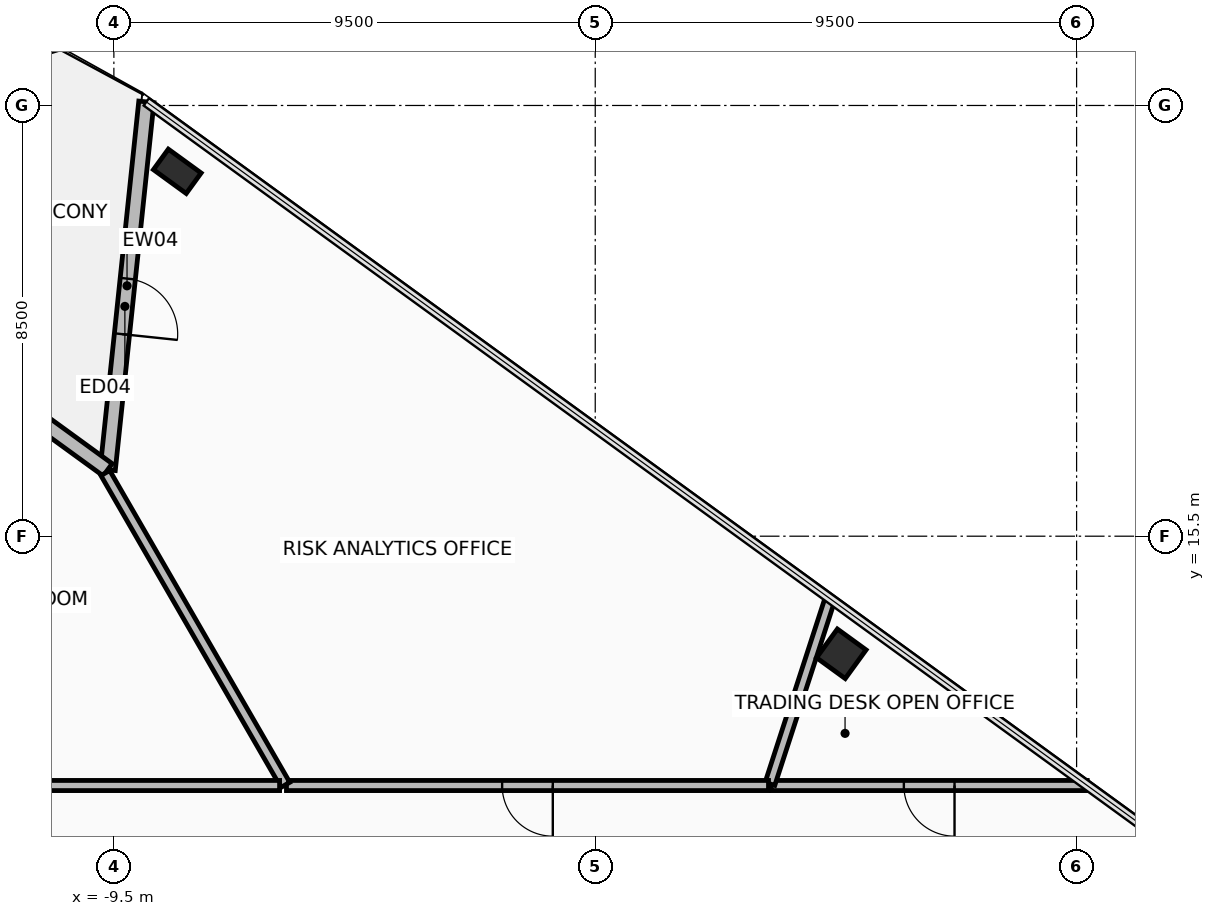
"""IFC4 building model, lengths in metres.
Left out: names, types, materials, properties, quantities, classifications, styles, units other than length and angle.
Written with IfcOpenShell. Run it as: python <this file> out.ifc"""

import sys

from ifc_helpers import new_model, si_unit, direction, frame, frame_2d, origin, origin_2d, place, context, subcontext, project, spatial, rectangle, hollow_rectangle, extrude, element, fill, save


model = new_model("IFC4")
c1 = context("Model", 3, precision=1e-05, world=origin(), true_north=direction((0.0, 1.0)))
c2 = subcontext(c1, "Body", "Model", "MODEL_VIEW")
j1 = project(units=[si_unit("LENGTHUNIT", "METRE"), si_unit("PLANEANGLEUNIT", "RADIAN")], contexts=[c1])
p1 = place(None, origin())
s1 = spatial("IfcSite", under=j1, at=p1, CompositionType="ELEMENT")
p2 = place(p1, origin())
s2 = spatial("IfcBuilding", under=s1, at=p2, CompositionType="ELEMENT")
p3 = place(p2, frame((0.0, 0.0, 116.05)))
s3 = spatial("IfcBuildingStorey", under=s2, at=p3, CompositionType="ELEMENT", Elevation=116.05)
p4 = place(p3, frame((4.856, 13.179, 0.0), z_axis=(0.0, 0.0, 1.0), x_axis=(-0.809016994375, 0.587785252292, 0.0)))
e1 = element("IfcColumn", 1, at=p4, inside=s3, PredefinedType="COLUMN", context=c2, shape_type="SweptSolid", body=[
    extrude(hollow_rectangle(XDim=0.7, YDim=0.7, WallThickness=0.04, at=origin_2d()), origin(), (0.0, 0.0, 1.0), 3.6),
])
p5 = place(p3, frame((-8.249, 22.701, 0.0), z_axis=(0.0, 0.0, 1.0), x_axis=(-0.809016994375, 0.587785252292, 0.0)))
e2 = element("IfcColumn", 2, at=p5, inside=s3, PredefinedType="COLUMN", context=c2, shape_type="SweptSolid", body=[
    extrude(hollow_rectangle(XDim=0.5, YDim=0.8, WallThickness=0.04, at=origin_2d()), origin(), (0.0, 0.0, 1.0), 3.6),
])
p6 = place(p3, frame((-8.859, 24.071, 0.0), z_axis=(0.0, 0.0, 1.0), x_axis=(-0.104512431924, -0.9945235802, 0.0)))
e3 = element("IfcWall", 3, at=p6, inside=s3, PredefinedType="STANDARD", context=c2, shape_type="SweptSolid", body=[
    extrude(rectangle(XDim=7.3, YDim=0.3, at=frame_2d((3.65, 0.0))), origin(), (0.0, 0.0, 1.0), 2.705),
])
p7 = place(p6, frame((3.508, 0.0, 0.0)))
e4 = element("IfcOpeningElement", 4, at=p7, cuts=e3, PredefinedType="OPENING", context=c2, shape_type="SweptSolid", body=[
    extrude(rectangle(XDim=1.1, YDim=2.2, at=frame_2d((0.55, 1.1))), frame((0.0, 0.16, 0.0), z_axis=(0.0, -1.0, 0.0), x_axis=(1.0, 0.0, 0.0)), (0.0, 0.0, 1.0), 0.32),
])
p8 = place(p3, frame((-9.622, 16.811, 0.0), z_axis=(0.0, 0.0, 1.0), x_axis=(-0.809002104592, 0.587805745775, 0.0)))
e5 = element("IfcWall", 5, at=p8, inside=s3, PredefinedType="STANDARD", context=c2, shape_type="SweptSolid", body=[
    extrude(rectangle(XDim=7.3, YDim=0.3, at=frame_2d((3.65, 0.0))), origin(), (0.0, 0.0, 1.0), 2.705),
])
p9 = place(p8, frame((2.85, 0.0, 0.325)))
e6 = element("IfcOpeningElement", 6, at=p9, cuts=e5, PredefinedType="OPENING", context=c2, shape_type="SweptSolid", body=[
    extrude(rectangle(XDim=1.6, YDim=2.2, at=frame_2d((0.8, 1.1))), frame((0.0, 0.16, 0.0), z_axis=(0.0, -1.0, 0.0), x_axis=(1.0, 0.0, 0.0)), (0.0, 0.0, 1.0), 0.32),
])
p10 = place(p3, frame((9.71, 10.58, 0.0), z_axis=(0.0, 0.0, 1.0), x_axis=(-1.0, 0.0, 0.0)))
e7 = element("IfcWall", 7, at=p10, inside=s3, PredefinedType="PARTITIONING", context=c2, shape_type="SweptSolid", body=[
    extrude(rectangle(XDim=6.238, YDim=0.2, at=frame_2d((3.119, 0.0))), origin(), (0.0, 0.0, 1.0), 2.705),
])
p11 = place(p10, frame((2.619, 0.0, 0.0)))
e8 = element("IfcOpeningElement", 8, at=p11, cuts=e7, PredefinedType="OPENING", context=c2, shape_type="SweptSolid", body=[
    extrude(rectangle(XDim=1.0, YDim=2.15, at=frame_2d((0.5, 1.075))), frame((0.0, 0.11, 0.0), z_axis=(0.0, -1.0, 0.0), x_axis=(1.0, 0.0, 0.0)), (0.0, 0.0, 1.0), 0.22),
])
p12 = place(p3, frame((3.448, 10.613, 0.0), z_axis=(0.0, 0.0, 1.0), x_axis=(0.309031469119, 0.951051813044, 0.0)))
e9 = element("IfcWall", 9, at=p12, inside=s3, PredefinedType="PARTITIONING", context=c2, shape_type="SweptSolid", body=[
    extrude(rectangle(XDim=3.842, YDim=0.2, at=frame_2d((1.921, 0.0))), origin(), (0.0, 0.0, 1.0), 2.705),
])
p13 = place(p3, frame((3.419, 10.58, 0.0), z_axis=(0.0, 0.0, 1.0), x_axis=(-1.0, 0.0, 0.0)))
e10 = element("IfcWall", 10, at=p13, inside=s3, PredefinedType="PARTITIONING", context=c2, shape_type="SweptSolid", body=[
    extrude(rectangle(XDim=9.513, YDim=0.2, at=frame_2d((4.757, 0.0))), origin(), (0.0, 0.0, 1.0), 3.045),
])
p14 = place(p13, frame((4.257, 0.0, 0.0)))
e11 = element("IfcOpeningElement", 11, at=p14, cuts=e10, PredefinedType="OPENING", context=c2, shape_type="SweptSolid", body=[
    extrude(rectangle(XDim=1.0, YDim=2.15, at=frame_2d((0.5, 1.075))), frame((0.0, 0.11, 0.0), z_axis=(0.0, -1.0, 0.0), x_axis=(1.0, 0.0, 0.0)), (0.0, 0.0, 1.0), 0.22),
])
p15 = place(p3, frame((-6.115, 10.593, 0.0), z_axis=(0.0, 0.0, 1.0), x_axis=(-0.50001885532, 0.866014517387, 0.0)))
e12 = element("IfcWall", 12, at=p15, inside=s3, PredefinedType="PARTITIONING", context=c2, shape_type="SweptSolid", body=[
    extrude(rectangle(XDim=7.106, YDim=0.2, at=frame_2d((3.553, 0.0))), origin(), (0.0, 0.0, 1.0), 2.855),
])
p16 = place(p3, frame((-6.229, 10.58, 0.0), z_axis=(0.0, 0.0, 1.0), x_axis=(-1.0, 0.0, 0.0)))
e13 = element("IfcWall", 13, at=p16, inside=s3, PredefinedType="PARTITIONING", context=c2, shape_type="SweptSolid", body=[
    extrude(rectangle(XDim=5.65, YDim=0.2, at=frame_2d((2.825, 0.0))), origin(), (0.0, 0.0, 1.0), 2.755),
])
p17 = place(p7, frame((1.1, 0.0, 0.0), z_axis=(0.0, 0.0, 1.0), x_axis=(-1.0, 0.0, 0.0)))
e14 = element("IfcDoor", 14, at=p17, inside=s3, OperationType="SINGLE_SWING_LEFT", PredefinedType="DOOR", context=c2, shape_type="SweptSolid", body=[
    extrude(rectangle(XDim=1.1, YDim=2.2, at=frame_2d((0.55, 1.1))), frame((0.0, 0.025, 0.0), z_axis=(0.0, -1.0, 0.0), x_axis=(1.0, 0.0, 0.0)), (0.0, 0.0, 1.0), 0.05),
])
fill(e4, e14)
p18 = place(p11, origin())
e15 = element("IfcDoor", 15, at=p18, inside=s3, OperationType="SINGLE_SWING_RIGHT", PredefinedType="DOOR", context=c2, shape_type="SweptSolid", body=[
    extrude(rectangle(XDim=1.0, YDim=2.15, at=frame_2d((0.5, 1.075))), frame((0.0, 0.025, 0.0), z_axis=(0.0, -1.0, 0.0), x_axis=(1.0, 0.0, 0.0)), (0.0, 0.0, 1.0), 0.05),
])
fill(e8, e15)
p19 = place(p14, origin())
e16 = element("IfcDoor", 16, at=p19, inside=s3, OperationType="SINGLE_SWING_RIGHT", PredefinedType="DOOR", context=c2, shape_type="SweptSolid", body=[
    extrude(rectangle(XDim=1.0, YDim=2.15, at=frame_2d((0.5, 1.075))), frame((0.0, 0.025, 0.0), z_axis=(0.0, -1.0, 0.0), x_axis=(1.0, 0.0, 0.0)), (0.0, 0.0, 1.0), 0.05),
])
fill(e11, e16)
save(model, sys.argv[1])
